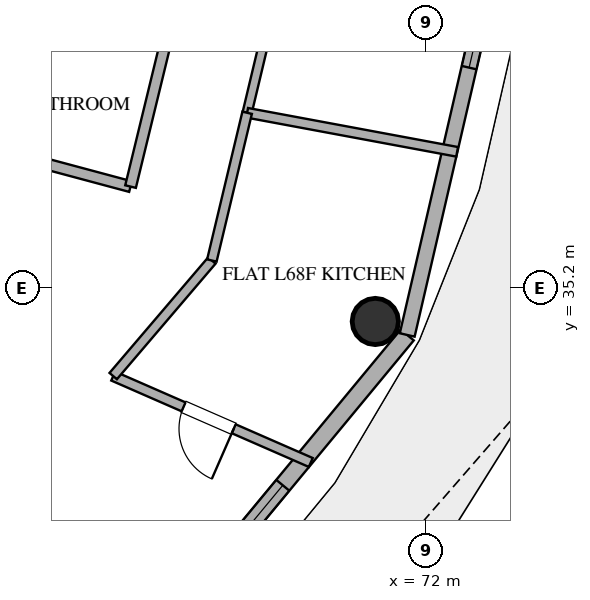
"""IFC4 building model, lengths in metres.
Left out: names, types, materials, properties, quantities, classifications, styles, units other than length and angle.
Written with IfcOpenShell. Run it as: python <this file> out.ifc"""

import sys

from ifc_helpers import new_model, si_unit, direction, frame, frame_2d, origin, origin_2d, place, context, subcontext, project, spatial, rectangle, hollow_circle, extrude, element, fill, save


model = new_model("IFC4")
c1 = context("Model", 3, precision=1e-05, world=origin(), true_north=direction((0.0, 1.0)))
c2 = subcontext(c1, "Body", "Model", "MODEL_VIEW")
j1 = project(units=[si_unit("LENGTHUNIT", "METRE"), si_unit("PLANEANGLEUNIT", "RADIAN")], contexts=[c1])
p1 = place(None, origin())
s1 = spatial("IfcSite", under=j1, at=p1, CompositionType="ELEMENT")
p2 = place(p1, origin())
s2 = spatial("IfcBuilding", under=s1, at=p2, CompositionType="ELEMENT")
p3 = place(p2, frame((0.0, 0.0, 265.8)))
s3 = spatial("IfcBuildingStorey", under=s2, at=p3, CompositionType="ELEMENT", Elevation=265.8)
p4 = place(p3, frame((71.169, 34.653, 0.0), z_axis=(0.0, 0.0, 1.0), x_axis=(1.0, 0.0, 0.0)))
e1 = element("IfcColumn", 1, at=p4, inside=s3, PredefinedType="COLUMN", context=c2, shape_type="SweptSolid", body=[
    extrude(hollow_circle(Radius=0.381, WallThickness=0.025, at=origin_2d()), origin(), (0.0, 0.0, 1.0), 3.37),
])
p5 = place(p3, frame((66.383, 28.013, 0.0), z_axis=(0.0, 0.0, 1.0), x_axis=(0.63761509934, 0.770355103243, 0.0)))
e2 = element("IfcWall", 2, at=p5, inside=s3, PredefinedType="SOLIDWALL", context=c2, shape_type="SweptSolid", body=[
    extrude(rectangle(XDim=8.33, YDim=0.28, at=frame_2d((4.165, 0.0))), origin(), (0.0, 0.0, 1.0), 3.37),
])
p6 = place(p5, frame((1.789, 0.0, 0.85)))
e3 = element("IfcOpeningElement", 3, at=p6, cuts=e2, PredefinedType="OPENING", context=c2, shape_type="SweptSolid", body=[
    extrude(rectangle(XDim=1.5, YDim=2.0, at=frame_2d((0.75, 1.0))), frame((0.0, 0.15, 0.0), z_axis=(0.0, -1.0, 0.0), x_axis=(1.0, 0.0, 0.0)), (0.0, 0.0, 1.0), 0.3),
])
p7 = place(p5, frame((3.621, 0.0, 0.85)))
e4 = element("IfcOpeningElement", 4, at=p7, cuts=e2, PredefinedType="OPENING", context=c2, shape_type="SweptSolid", body=[
    extrude(rectangle(XDim=1.5, YDim=2.0, at=frame_2d((0.75, 1.0))), frame((0.0, 0.15, 0.0), z_axis=(0.0, -1.0, 0.0), x_axis=(1.0, 0.0, 0.0)), (0.0, 0.0, 1.0), 0.3),
])
p8 = place(p3, frame((71.694, 34.43, 0.0), z_axis=(0.0, 0.0, 1.0), x_axis=(0.225635078214, 0.974211892495, 0.0)))
e5 = element("IfcWall", 5, at=p8, inside=s3, PredefinedType="SOLIDWALL", context=c2, shape_type="SweptSolid", body=[
    extrude(rectangle(XDim=7.77, YDim=0.25, at=frame_2d((3.885, 0.0))), origin(), (0.0, 0.0, 1.0), 3.37),
])
p9 = place(p8, frame((4.513, 0.0, 0.35)))
e6 = element("IfcOpeningElement", 6, at=p9, cuts=e5, PredefinedType="OPENING", context=c2, shape_type="SweptSolid", body=[
    extrude(rectangle(XDim=1.0, YDim=1.05, at=frame_2d((0.5, 0.525))), frame((0.0, 0.135, 0.0), z_axis=(0.0, -1.0, 0.0), x_axis=(1.0, 0.0, 0.0)), (0.0, 0.0, 1.0), 0.27),
])
p10 = place(p3, frame((67.144, 36.871, 0.0), z_axis=(0.0, 0.0, 1.0), x_axis=(-0.965930696626, 0.258800868073, 0.0)))
e7 = element("IfcWall", 7, at=p10, inside=s3, PredefinedType="PLUMBINGWALL", context=c2, shape_type="SweptSolid", body=[
    extrude(rectangle(XDim=6.154, YDim=0.18, at=frame_2d((3.077, 0.0))), origin(), (0.0, 0.0, 1.0), 2.73),
])
p11 = place(p3, frame((69.061, 38.084, 0.0), z_axis=(0.0, 0.0, 1.0), x_axis=(0.232333768072, 0.972636119118, 0.0)))
e8 = element("IfcWall", 8, at=p11, inside=s3, PredefinedType="PARTITIONING", context=c2, shape_type="SweptSolid", body=[
    extrude(rectangle(XDim=4.026, YDim=0.15, at=frame_2d((2.013, 0.0))), origin(), (0.0, 0.0, 1.0), 2.73),
])
p12 = place(p11, frame((1.563, 0.0, 0.0)))
e9 = element("IfcOpeningElement", 9, at=p12, cuts=e8, PredefinedType="OPENING", context=c2, shape_type="SweptSolid", body=[
    extrude(rectangle(XDim=0.9, YDim=2.1, at=frame_2d((0.45, 1.05))), frame((0.0, 0.085, 0.0), z_axis=(0.0, -1.0, 0.0), x_axis=(1.0, 0.0, 0.0)), (0.0, 0.0, 1.0), 0.17),
])
p13 = place(p3, frame((70.108, 32.333, 0.0), z_axis=(0.0, 0.0, 1.0), x_axis=(-0.916236311754, 0.400638267048, 0.0)))
e10 = element("IfcWall", 10, at=p13, inside=s3, PredefinedType="PLUMBINGWALL", context=c2, shape_type="SweptSolid", body=[
    extrude(rectangle(XDim=3.547, YDim=0.16, at=frame_2d((1.773, 0.0))), origin(), (0.0, 0.0, 1.0), 2.73),
])
p14 = place(p13, frame((1.383, 0.0, 0.0)))
e11 = element("IfcOpeningElement", 11, at=p14, cuts=e10, PredefinedType="OPENING", context=c2, shape_type="SweptSolid", body=[
    extrude(rectangle(XDim=0.9, YDim=2.1, at=frame_2d((0.45, 1.05))), frame((0.0, 0.09, 0.0), z_axis=(0.0, -1.0, 0.0), x_axis=(1.0, 0.0, 0.0)), (0.0, 0.0, 1.0), 0.18),
])
p15 = place(p3, frame((72.514, 37.442, 0.0), z_axis=(0.0, 0.0, 1.0), x_axis=(-0.983150389917, 0.182798552526, 0.0)))
e12 = element("IfcWall", 12, at=p15, inside=s3, PredefinedType="PLUMBINGWALL", context=c2, shape_type="SweptSolid", body=[
    extrude(rectangle(XDim=3.512, YDim=0.16, at=frame_2d((1.756, 0.0))), origin(), (0.0, 0.0, 1.0), 2.73),
])
p16 = place(p3, frame((67.742, 39.328, 0.0), z_axis=(0.0, 0.0, 1.0), x_axis=(-0.236511691524, -0.971628642935, 0.0)))
e13 = element("IfcWall", 13, at=p16, inside=s3, PredefinedType="PLUMBINGWALL", context=c2, shape_type="SweptSolid", body=[
    extrude(rectangle(XDim=2.529, YDim=0.18, at=frame_2d((1.265, 0.0))), origin(), (0.0, 0.0, 1.0), 2.73),
])
p17 = place(p3, frame((66.858, 33.754, 0.0), z_axis=(0.0, 0.0, 1.0), x_axis=(0.649277541607, 0.760551559044, 0.0)))
e14 = element("IfcWall", 14, at=p17, inside=s3, PredefinedType="PLUMBINGWALL", context=c2, shape_type="SweptSolid", body=[
    extrude(rectangle(XDim=2.499, YDim=0.16, at=frame_2d((1.25, 0.0))), origin(), (0.0, 0.0, 1.0), 2.73),
])
p18 = place(p3, frame((68.481, 35.655, 0.0), z_axis=(0.0, 0.0, 1.0), x_axis=(0.232241557879, 0.972658140764, 0.0)))
e15 = element("IfcWall", 15, at=p18, inside=s3, PredefinedType="PLUMBINGWALL", context=c2, shape_type="SweptSolid", body=[
    extrude(rectangle(XDim=2.498, YDim=0.16, at=frame_2d((1.249, 0.0))), origin(), (0.0, 0.0, 1.0), 2.73),
])
p19 = place(p7, origin())
e16 = element("IfcWindow", 16, at=p19, inside=s3, PartitioningType="SINGLE_PANEL", PredefinedType="WINDOW", context=c2, shape_type="SweptSolid", body=[
    extrude(rectangle(XDim=1.5, YDim=2.0, at=frame_2d((0.75, 1.0))), frame((0.0, 0.03, 0.0), z_axis=(0.0, -1.0, 0.0), x_axis=(1.0, 0.0, 0.0)), (0.0, 0.0, 1.0), 0.06),
])
fill(e4, e16)
p20 = place(p9, origin())
e17 = element("IfcWindow", 17, at=p20, inside=s3, PartitioningType="SINGLE_PANEL", PredefinedType="WINDOW", context=c2, shape_type="SweptSolid", body=[
    extrude(rectangle(XDim=1.0, YDim=1.05, at=frame_2d((0.5, 0.525))), frame((0.0, 0.03, 0.0), z_axis=(0.0, -1.0, 0.0), x_axis=(1.0, 0.0, 0.0)), (0.0, 0.0, 1.0), 0.06),
])
fill(e6, e17)
p21 = place(p14, origin())
e18 = element("IfcDoor", 18, at=p21, inside=s3, OperationType="SINGLE_SWING_LEFT", PredefinedType="DOOR", context=c2, shape_type="SweptSolid", body=[
    extrude(rectangle(XDim=0.9, YDim=2.1, at=frame_2d((0.45, 1.05))), frame((0.0, 0.025, 0.0), z_axis=(0.0, -1.0, 0.0), x_axis=(1.0, 0.0, 0.0)), (0.0, 0.0, 1.0), 0.05),
])
fill(e11, e18)
save(model, sys.argv[1])
